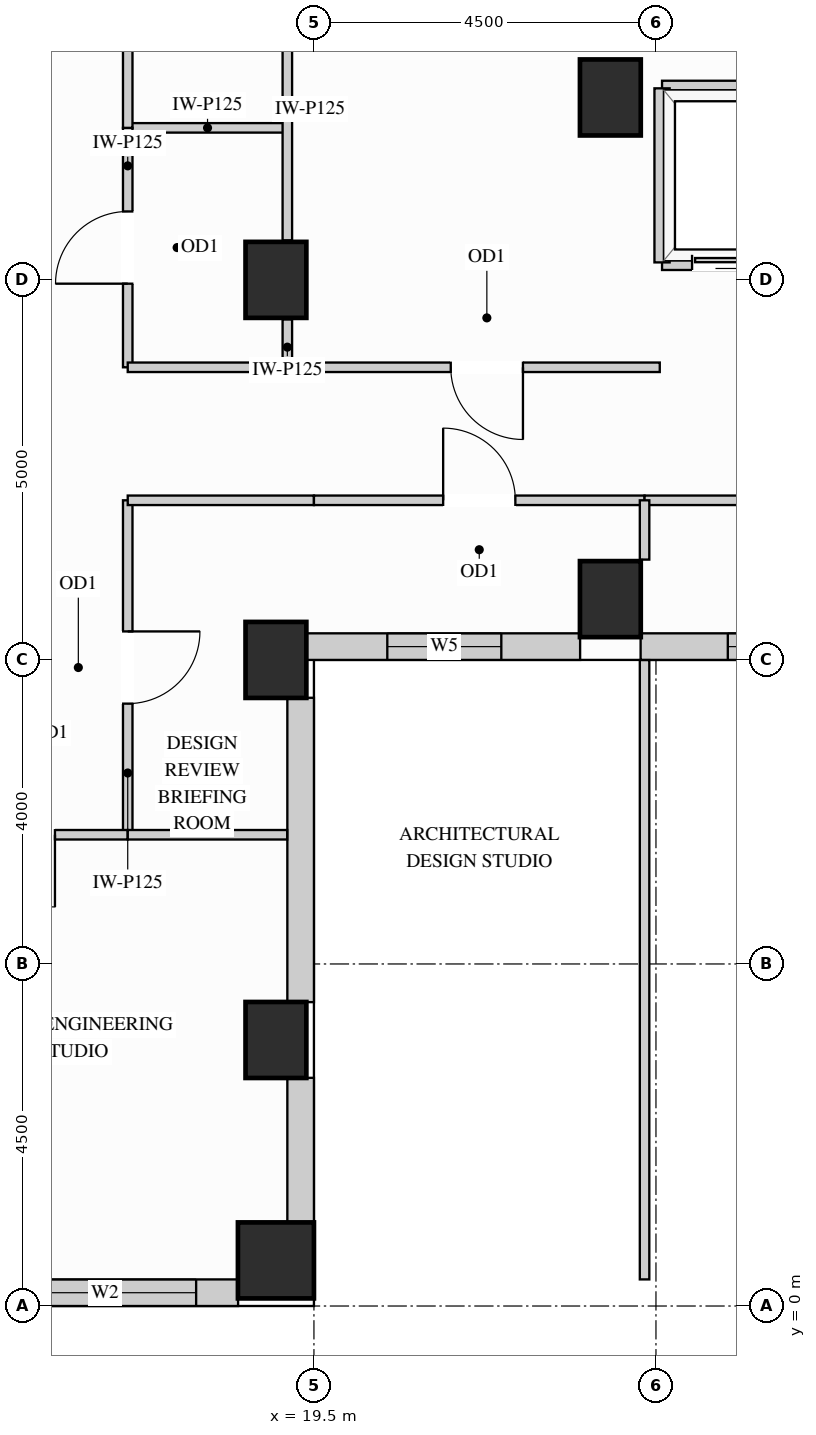
"""IFC4 building model, lengths in metres.
Left out: names, types, materials, properties, quantities, classifications, styles, units other than length and angle.
Written with IfcOpenShell. Run it as: python <this file> out.ifc"""

import sys

from ifc_helpers import new_model, si_unit, direction, frame, frame_2d, origin, origin_2d, place, context, subcontext, project, spatial, rectangle, extrude, source, transform, mapped, element, fill, save


model = new_model("IFC4")
c1 = context("Model", 3, precision=1e-05, world=origin(), true_north=direction((0.0, 1.0)))
c2 = subcontext(c1, "Body", "Model", "MODEL_VIEW")
j1 = project(units=[si_unit("LENGTHUNIT", "METRE"), si_unit("PLANEANGLEUNIT", "RADIAN")], contexts=[c1])
p1 = place(None, origin())
s1 = spatial("IfcSite", under=j1, at=p1, CompositionType="ELEMENT")
p2 = place(p1, origin())
s2 = spatial("IfcBuilding", under=s1, at=p2, CompositionType="ELEMENT")
p3 = place(p2, frame((0.0, 0.0, 200.7)))
s3 = spatial("IfcBuildingStorey", under=s2, at=p3, CompositionType="ELEMENT", Elevation=200.7)
m1 = source(origin(), c2, "Body", "SweptSolid", [
    extrude(rectangle(XDim=0.8, YDim=1.0, at=origin_2d()), origin(), (0.0, 0.0, 1.0), 3.4),
])
for number, where, z_axis, x_axis in (
    (1, (19.0, 13.5, 0.0), (0.0, 0.0, 1.0), (1.0, 0.0, 0.0)),
    (2, (19.0, 3.5, 0.0), (0.0, 0.0, 1.0), (1.0, 0.0, 0.0)),
    (3, (19.0, 8.5, 0.0), (0.0, 0.0, 1.0), (1.0, 0.0, 0.0)),
    (4, (23.4, 15.9, 0.0), (0.0, 0.0, 1.0), (1.0, 0.0, 0.0)),
    (5, (23.4, 9.3, 0.0), (0.0, 0.0, 1.0), (1.0, 0.0, 0.0)),
):
    element("IfcColumn", number, at=place(p3, frame(where, z_axis=z_axis, x_axis=x_axis)), inside=s3, PredefinedType="COLUMN", context=c2, shape_type="MappedRepresentation", body=[
        mapped(m1, transform((0.0, 0.0, 0.0), x_axis=(1.0, 0.0, 0.0), y_axis=(0.0, 1.0, 0.0), z_axis=(0.0, 0.0, 1.0))),
    ])
m2 = source(origin(), c2, "Body", "SweptSolid", [
    extrude(rectangle(XDim=1.0, YDim=1.0, at=origin_2d()), origin(), (0.0, 0.0, 1.0), 3.4),
])
p4 = place(p3, frame((19.0, 0.6, 0.0), z_axis=(0.0, 0.0, 1.0), x_axis=(1.0, 0.0, 0.0)))
e6 = element("IfcColumn", 6, at=p4, inside=s3, PredefinedType="COLUMN", context=c2, shape_type="MappedRepresentation", body=[
    mapped(m2, transform((0.0, 0.0, 0.0), x_axis=(1.0, 0.0, 0.0), y_axis=(0.0, 1.0, 0.0), z_axis=(0.0, 0.0, 1.0))),
])
p5 = place(p3, frame((14.998, 0.175, 0.0), z_axis=(0.0, 0.0, 1.0), x_axis=(1.0, 0.0, 0.0)))
e7 = element("IfcWall", 7, at=p5, inside=s3, PredefinedType="SOLIDWALL", context=c2, shape_type="SweptSolid", body=[
    extrude(rectangle(XDim=3.504, YDim=0.35, at=frame_2d((1.752, 0.0))), origin(), (0.0, 0.0, 1.0), 2.612),
])
p6 = place(p5, frame((0.552, 0.0, 0.78)))
e8 = element("IfcOpeningElement", 8, at=p6, cuts=e7, PredefinedType="OPENING", context=c2, shape_type="SweptSolid", body=[
    extrude(rectangle(XDim=2.4, YDim=1.652, at=frame_2d((1.2, 0.826))), frame((0.0, 0.185, 0.0), z_axis=(0.0, -1.0, 0.0), x_axis=(1.0, 0.0, 0.0)), (0.0, 0.0, 1.0), 0.37),
])
m3 = source(origin(), c2, "Body", "SweptSolid", [
    extrude(rectangle(XDim=1.904, YDim=0.35, at=frame_2d((0.952, 0.0))), origin(), (0.0, 0.0, 1.0), 2.612),
])
p7 = place(p3, frame((19.325, 1.098, 0.0), z_axis=(0.0, 0.0, 1.0), x_axis=(0.0, 1.0, 0.0)))
e9 = element("IfcWall", 9, at=p7, inside=s3, PredefinedType="SOLIDWALL", context=c2, shape_type="MappedRepresentation", body=[
    mapped(m3, transform((0.0, 0.0, 0.0), x_axis=(1.0, 0.0, 0.0), y_axis=(0.0, 1.0, 0.0), z_axis=(0.0, 0.0, 1.0))),
])
m4 = source(origin(), c2, "Body", "SweptSolid", [
    extrude(rectangle(XDim=4.004, YDim=0.35, at=frame_2d((2.002, 0.0))), origin(), (0.0, 0.0, 1.0), 2.612),
])
p8 = place(p3, frame((19.325, 3.998, 0.0), z_axis=(0.0, 0.0, 1.0), x_axis=(0.0, 1.0, 0.0)))
e10 = element("IfcWall", 10, at=p8, inside=s3, PredefinedType="SOLIDWALL", context=c2, shape_type="MappedRepresentation", body=[
    mapped(m4, transform((0.0, 0.0, 0.0), x_axis=(1.0, 0.0, 0.0), y_axis=(0.0, 1.0, 0.0), z_axis=(0.0, 0.0, 1.0))),
])
p9 = place(p3, frame((19.398, 8.675, 0.0), z_axis=(0.0, 0.0, 1.0), x_axis=(1.0, 0.0, 0.0)))
e11 = element("IfcWall", 11, at=p9, inside=s3, PredefinedType="SOLIDWALL", context=c2, shape_type="SweptSolid", body=[
    extrude(rectangle(XDim=3.604, YDim=0.35, at=frame_2d((1.802, 0.0))), origin(), (0.0, 0.0, 1.0), 3.385),
])
p10 = place(p9, frame((1.067, 0.0, 0.78)))
e12 = element("IfcOpeningElement", 12, at=p10, cuts=e11, PredefinedType="OPENING", context=c2, shape_type="SweptSolid", body=[
    extrude(rectangle(XDim=1.5, YDim=2.0, at=frame_2d((0.75, 1.0))), frame((0.0, 0.185, 0.0), z_axis=(0.0, -1.0, 0.0), x_axis=(1.0, 0.0, 0.0)), (0.0, 0.0, 1.0), 0.37),
])
p11 = place(p3, frame((23.798, 8.675, 0.0), z_axis=(0.0, 0.0, 1.0), x_axis=(1.0, 0.0, 0.0)))
e13 = element("IfcWall", 13, at=p11, inside=s3, PredefinedType="SOLIDWALL", context=c2, shape_type="SweptSolid", body=[
    extrude(rectangle(XDim=6.304, YDim=0.35, at=frame_2d((3.152, 0.0))), origin(), (0.0, 0.0, 1.0), 3.385),
])
p12 = place(p11, frame((1.147, 0.0, 0.78)))
e14 = element("IfcOpeningElement", 14, at=p12, cuts=e13, PredefinedType="OPENING", context=c2, shape_type="SweptSolid", body=[
    extrude(rectangle(XDim=1.5, YDim=2.0, at=frame_2d((0.75, 1.0))), frame((0.0, 0.185, 0.0), z_axis=(0.0, -1.0, 0.0), x_axis=(1.0, 0.0, 0.0)), (0.0, 0.0, 1.0), 0.37),
])
p13 = place(p11, frame((3.475, 0.0, 0.78)))
e15 = element("IfcOpeningElement", 15, at=p13, cuts=e13, PredefinedType="OPENING", context=c2, shape_type="SweptSolid", body=[
    extrude(rectangle(XDim=1.5, YDim=2.0, at=frame_2d((0.75, 1.0))), frame((0.0, 0.185, 0.0), z_axis=(0.0, -1.0, 0.0), x_axis=(1.0, 0.0, 0.0)), (0.0, 0.0, 1.0), 0.37),
])
m5 = source(origin(), c2, "Body", "SweptSolid", [
    extrude(rectangle(XDim=2.1, YDim=0.125, at=frame_2d((1.05, 0.0))), origin(), (0.0, 0.0, 1.0), 3.385),
])
p14 = place(p3, frame((17.05, 15.5, 0.0), z_axis=(0.0, 0.0, 1.0), x_axis=(1.0, 0.0, 0.0)))
e16 = element("IfcWall", 16, at=p14, inside=s3, PredefinedType="PARTITIONING", context=c2, shape_type="MappedRepresentation", body=[
    mapped(m5, transform((0.0, 0.0, 0.0), x_axis=(1.0, 0.0, 0.0), y_axis=(0.0, 1.0, 0.0), z_axis=(0.0, 0.0, 1.0))),
])
m6 = source(origin(), c2, "Body", "SweptSolid", [
    extrude(rectangle(XDim=0.63, YDim=0.125, at=frame_2d((0.315, 0.0))), origin(), (0.0, 0.0, 1.0), 2.773),
])
p15 = place(p3, frame((19.15, 12.35, 0.0), z_axis=(0.0, 0.0, 1.0), x_axis=(0.0, 1.0, 0.0)))
e17 = element("IfcWall", 17, at=p15, inside=s3, PredefinedType="PARTITIONING", context=c2, shape_type="MappedRepresentation", body=[
    mapped(m6, transform((0.0, 0.0, 0.0), x_axis=(1.0, 0.0, 0.0), y_axis=(0.0, 1.0, 0.0), z_axis=(0.0, 0.0, 1.0))),
])
m7 = source(origin(), c2, "Body", "SweptSolid", [
    extrude(rectangle(XDim=3.46, YDim=0.125, at=frame_2d((1.73, 0.0))), origin(), (0.0, 0.0, 1.0), 2.773),
])
p16 = place(p3, frame((19.15, 14.02, 0.0), z_axis=(0.0, 0.0, 1.0), x_axis=(0.0, 1.0, 0.0)))
e18 = element("IfcWall", 18, at=p16, inside=s3, PredefinedType="PARTITIONING", context=c2, shape_type="MappedRepresentation", body=[
    mapped(m7, transform((0.0, 0.0, 0.0), x_axis=(1.0, 0.0, 0.0), y_axis=(0.0, 1.0, 0.0), z_axis=(0.0, 0.0, 1.0))),
])
p17 = place(p3, frame((17.05, 12.35, 0.0), z_axis=(0.0, 0.0, 1.0), x_axis=(0.0, 1.0, 0.0)))
e19 = element("IfcWall", 19, at=p17, inside=s3, PredefinedType="PARTITIONING", context=c2, shape_type="SweptSolid", body=[
    extrude(rectangle(XDim=3.15, YDim=0.125, at=frame_2d((1.575, 0.0))), origin(), (0.0, 0.0, 1.0), 3.385),
])
p18 = place(p17, frame((1.1, 0.0, 0.0)))
e20 = element("IfcOpeningElement", 20, at=p18, cuts=e19, PredefinedType="OPENING", context=c2, shape_type="SweptSolid", body=[
    extrude(rectangle(XDim=0.95, YDim=2.15, at=frame_2d((0.475, 1.075))), frame((0.0, 0.073, 0.0), z_axis=(0.0, -1.0, 0.0), x_axis=(1.0, 0.0, 0.0)), (0.0, 0.0, 1.0), 0.145),
])
p19 = place(p3, frame((17.05, 15.5, 0.0), z_axis=(0.0, 0.0, 1.0), x_axis=(0.0, 1.0, 0.0)))
e21 = element("IfcWall", 21, at=p19, inside=s3, PredefinedType="PARTITIONING", context=c2, shape_type="SweptSolid", body=[
    extrude(rectangle(XDim=7.85, YDim=0.125, at=frame_2d((3.925, 0.0))), origin(), (0.0, 0.0, 1.0), 3.385),
])
p20 = place(p19, frame((3.45, 0.0, 0.0)))
e22 = element("IfcOpeningElement", 22, at=p20, cuts=e21, PredefinedType="OPENING", context=c2, shape_type="SweptSolid", body=[
    extrude(rectangle(XDim=0.95, YDim=2.15, at=frame_2d((0.475, 1.075))), frame((0.0, 0.073, 0.0), z_axis=(0.0, -1.0, 0.0), x_axis=(1.0, 0.0, 0.0)), (0.0, 0.0, 1.0), 0.145),
])
p21 = place(p3, frame((17.05, 6.2, 0.0), z_axis=(0.0, 0.0, 1.0), x_axis=(0.0, 1.0, 0.0)))
e23 = element("IfcWall", 23, at=p21, inside=s3, PredefinedType="PARTITIONING", context=c2, shape_type="SweptSolid", body=[
    extrude(rectangle(XDim=4.4, YDim=0.125, at=frame_2d((2.2, 0.0))), origin(), (0.0, 0.0, 1.0), 3.385),
])
p22 = place(p21, frame((1.725, 0.0, 0.0)))
e24 = element("IfcOpeningElement", 24, at=p22, cuts=e23, PredefinedType="OPENING", context=c2, shape_type="SweptSolid", body=[
    extrude(rectangle(XDim=0.95, YDim=2.15, at=frame_2d((0.475, 1.075))), frame((0.0, 0.073, 0.0), z_axis=(0.0, -1.0, 0.0), x_axis=(1.0, 0.0, 0.0)), (0.0, 0.0, 1.0), 0.145),
])
m8 = source(origin(), c2, "Body", "SweptSolid", [
    extrude(rectangle(XDim=2.45, YDim=0.125, at=frame_2d((1.225, 0.0))), origin(), (0.0, 0.0, 1.0), 3.385),
])
p23 = place(p3, frame((17.05, 12.35, 0.0), z_axis=(0.0, 0.0, 1.0), x_axis=(1.0, 0.0, 0.0)))
e25 = element("IfcWall", 25, at=p23, inside=s3, PredefinedType="PARTITIONING", context=c2, shape_type="MappedRepresentation", body=[
    mapped(m8, transform((0.0, 0.0, 0.0), x_axis=(1.0, 0.0, 0.0), y_axis=(0.0, 1.0, 0.0), z_axis=(0.0, 0.0, 1.0))),
])
p24 = place(p3, frame((19.5, 12.35, 0.0), z_axis=(0.0, 0.0, 1.0), x_axis=(1.0, 0.0, 0.0)))
e26 = element("IfcWall", 26, at=p24, inside=s3, PredefinedType="PARTITIONING", context=c2, shape_type="SweptSolid", body=[
    extrude(rectangle(XDim=4.55, YDim=0.125, at=frame_2d((2.275, 0.0))), origin(), (0.0, 0.0, 1.0), 3.385),
])
p25 = place(p24, frame((1.8, 0.0, 0.0)))
e27 = element("IfcOpeningElement", 27, at=p25, cuts=e26, PredefinedType="OPENING", context=c2, shape_type="SweptSolid", body=[
    extrude(rectangle(XDim=0.95, YDim=2.15, at=frame_2d((0.475, 1.075))), frame((0.0, 0.073, 0.0), z_axis=(0.0, -1.0, 0.0), x_axis=(1.0, 0.0, 0.0)), (0.0, 0.0, 1.0), 0.145),
])
p26 = place(p3, frame((17.05, 10.6, 0.0), z_axis=(0.0, 0.0, 1.0), x_axis=(1.0, 0.0, 0.0)))
e28 = element("IfcWall", 28, at=p26, inside=s3, PredefinedType="PARTITIONING", context=c2, shape_type="MappedRepresentation", body=[
    mapped(m8, transform((0.0, 0.0, 0.0), x_axis=(1.0, 0.0, 0.0), y_axis=(0.0, 1.0, 0.0), z_axis=(0.0, 0.0, 1.0))),
])
p27 = place(p3, frame((19.5, 10.6, 0.0), z_axis=(0.0, 0.0, 1.0), x_axis=(1.0, 0.0, 0.0)))
e29 = element("IfcWall", 29, at=p27, inside=s3, PredefinedType="PARTITIONING", context=c2, shape_type="SweptSolid", body=[
    extrude(rectangle(XDim=4.35, YDim=0.125, at=frame_2d((2.175, 0.0))), origin(), (0.0, 0.0, 1.0), 3.385),
])
p28 = place(p27, frame((1.7, 0.0, 0.0)))
e30 = element("IfcOpeningElement", 30, at=p28, cuts=e29, PredefinedType="OPENING", context=c2, shape_type="SweptSolid", body=[
    extrude(rectangle(XDim=0.95, YDim=2.15, at=frame_2d((0.475, 1.075))), frame((0.0, 0.073, 0.0), z_axis=(0.0, -1.0, 0.0), x_axis=(1.0, 0.0, 0.0)), (0.0, 0.0, 1.0), 0.145),
])
p29 = place(p3, frame((23.85, 10.6, 0.0), z_axis=(0.0, 0.0, 1.0), x_axis=(1.0, 0.0, 0.0)))
e31 = element("IfcWall", 31, at=p29, inside=s3, PredefinedType="PARTITIONING", context=c2, shape_type="SweptSolid", body=[
    extrude(rectangle(XDim=6.0, YDim=0.125, at=frame_2d((3.0, 0.0))), origin(), (0.0, 0.0, 1.0), 3.385),
])
p30 = place(p29, frame((2.525, 0.0, 0.0)))
e32 = element("IfcOpeningElement", 32, at=p30, cuts=e31, PredefinedType="OPENING", context=c2, shape_type="SweptSolid", body=[
    extrude(rectangle(XDim=0.95, YDim=2.15, at=frame_2d((0.475, 1.075))), frame((0.0, 0.073, 0.0), z_axis=(0.0, -1.0, 0.0), x_axis=(1.0, 0.0, 0.0)), (0.0, 0.0, 1.0), 0.145),
])
m9 = source(origin(), c2, "Body", "SweptSolid", [
    extrude(rectangle(XDim=8.148, YDim=0.125, at=frame_2d((4.074, 0.0))), origin(), (0.0, 0.0, 1.0), 3.385),
])
p31 = place(p3, frame((23.85, 0.35, 0.0), z_axis=(0.0, 0.0, 1.0), x_axis=(0.0, 1.0, 0.0)))
e33 = element("IfcWall", 33, at=p31, inside=s3, PredefinedType="PARTITIONING", context=c2, shape_type="MappedRepresentation", body=[
    mapped(m9, transform((0.0, 0.0, 0.0), x_axis=(1.0, 0.0, 0.0), y_axis=(0.0, 1.0, 0.0), z_axis=(0.0, 0.0, 1.0))),
])
m10 = source(origin(), c2, "Body", "SweptSolid", [
    extrude(rectangle(XDim=0.78, YDim=0.125, at=frame_2d((0.39, 0.0))), origin(), (0.0, 0.0, 1.0), 3.385),
])
p32 = place(p3, frame((23.85, 9.82, 0.0), z_axis=(0.0, 0.0, 1.0), x_axis=(0.0, 1.0, 0.0)))
e34 = element("IfcWall", 34, at=p32, inside=s3, PredefinedType="PARTITIONING", context=c2, shape_type="MappedRepresentation", body=[
    mapped(m10, transform((0.0, 0.0, 0.0), x_axis=(1.0, 0.0, 0.0), y_axis=(0.0, 1.0, 0.0), z_axis=(0.0, 0.0, 1.0))),
])
p33 = place(p3, frame((14.185, 6.2, 0.0), z_axis=(0.0, 0.0, 1.0), x_axis=(1.0, 0.0, 0.0)))
e35 = element("IfcWall", 35, at=p33, inside=s3, PredefinedType="PARTITIONING", context=c2, shape_type="SweptSolid", body=[
    extrude(rectangle(XDim=2.865, YDim=0.125, at=frame_2d((1.433, 0.0))), origin(), (0.0, 0.0, 1.0), 2.848),
])
p34 = place(p33, frame((0.958, 0.0, 0.0)))
e36 = element("IfcOpeningElement", 36, at=p34, cuts=e35, PredefinedType="OPENING", context=c2, shape_type="SweptSolid", body=[
    extrude(rectangle(XDim=0.95, YDim=2.15, at=frame_2d((0.475, 1.075))), frame((0.0, 0.073, 0.0), z_axis=(0.0, -1.0, 0.0), x_axis=(1.0, 0.0, 0.0)), (0.0, 0.0, 1.0), 0.145),
])
m11 = source(origin(), c2, "Body", "SweptSolid", [
    extrude(rectangle(XDim=2.098, YDim=0.125, at=frame_2d((1.049, 0.0))), origin(), (0.0, 0.0, 1.0), 2.848),
])
p35 = place(p3, frame((17.05, 6.2, 0.0), z_axis=(0.0, 0.0, 1.0), x_axis=(1.0, 0.0, 0.0)))
e37 = element("IfcWall", 37, at=p35, inside=s3, PredefinedType="PARTITIONING", context=c2, shape_type="MappedRepresentation", body=[
    mapped(m11, transform((0.0, 0.0, 0.0), x_axis=(1.0, 0.0, 0.0), y_axis=(0.0, 1.0, 0.0), z_axis=(0.0, 0.0, 1.0))),
])
m12 = source(origin(), c2, "Body", "SweptSolid", [
    extrude(rectangle(XDim=1.89, YDim=0.2, at=frame_2d((0.945, 0.0))), origin(), (0.0, 0.0, 1.0), 2.773),
])
p36 = place(p3, frame((24.08, 16.02, 0.0), z_axis=(0.0, 0.0, 1.0), x_axis=(1.0, 0.0, 0.0)))
e38 = element("IfcWall", 38, at=p36, inside=s3, PredefinedType="PARTITIONING", context=c2, shape_type="MappedRepresentation", body=[
    mapped(m12, transform((0.0, 0.0, 0.0), x_axis=(1.0, 0.0, 0.0), y_axis=(0.0, 1.0, 0.0), z_axis=(0.0, 0.0, 1.0))),
])
p37 = place(p3, frame((24.08, 13.73, 0.0), z_axis=(0.0, 0.0, 1.0), x_axis=(1.0, 0.0, 0.0)))
e39 = element("IfcWall", 39, at=p37, inside=s3, PredefinedType="PARTITIONING", context=c2, shape_type="SweptSolid", body=[
    extrude(rectangle(XDim=1.89, YDim=0.2, at=frame_2d((0.945, 0.0))), origin(), (0.0, 0.0, 1.0), 2.466),
])
p38 = place(p37, frame((0.395, 0.0, 0.0)))
e40 = element("IfcOpeningElement", 40, at=p38, cuts=e39, PredefinedType="OPENING", context=c2, shape_type="SweptSolid", body=[
    extrude(rectangle(XDim=1.1, YDim=2.2, at=frame_2d((0.55, 1.1))), frame((0.0, 0.11, 0.0), z_axis=(0.0, -1.0, 0.0), x_axis=(1.0, 0.0, 0.0)), (0.0, 0.0, 1.0), 0.22),
])
m13 = source(origin(), c2, "Body", "SweptSolid", [
    extrude(rectangle(XDim=2.29, YDim=0.2, at=frame_2d((1.145, 0.0))), origin(), (0.0, 0.0, 1.0), 3.385),
])
p39 = place(p3, frame((24.08, 13.73, 0.0), z_axis=(0.0, 0.0, 1.0), x_axis=(0.0, 1.0, 0.0)))
e41 = element("IfcWall", 41, at=p39, inside=s3, PredefinedType="PARTITIONING", context=c2, shape_type="MappedRepresentation", body=[
    mapped(m13, transform((0.0, 0.0, 0.0), x_axis=(1.0, 0.0, 0.0), y_axis=(0.0, 1.0, 0.0), z_axis=(0.0, 0.0, 1.0))),
])
m14 = source(origin(), c2, "Body", "SweptSolid", [
    extrude(rectangle(XDim=1.1, YDim=2.2, at=frame_2d((0.55, 1.1))), frame((0.0, 0.025, 0.0), z_axis=(0.0, -1.0, 0.0), x_axis=(1.0, 0.0, 0.0)), (0.0, 0.0, 1.0), 0.05),
])
p40 = place(p38, origin())
e42 = element("IfcDoor", 42, at=p40, inside=s3, OperationType="SLIDING_TO_LEFT", PredefinedType="DOOR", context=c2, shape_type="MappedRepresentation", body=[
    mapped(m14, transform((0.0, 0.0, 0.0), x_axis=(1.0, 0.0, 0.0), y_axis=(0.0, 1.0, 0.0), z_axis=(0.0, 0.0, 1.0))),
])
fill(e40, e42)
m15 = source(origin(), c2, "Body", "SweptSolid", [
    extrude(rectangle(XDim=0.95, YDim=2.15, at=frame_2d((0.475, 1.075))), frame((0.0, 0.025, 0.0), z_axis=(0.0, -1.0, 0.0), x_axis=(1.0, 0.0, 0.0)), (0.0, 0.0, 1.0), 0.05),
])
p41 = place(p22, origin())
e43 = element("IfcDoor", 43, at=p41, inside=s3, OperationType="SINGLE_SWING_RIGHT", PredefinedType="DOOR", context=c2, shape_type="MappedRepresentation", body=[
    mapped(m15, transform((0.0, 0.0, 0.0), x_axis=(1.0, 0.0, 0.0), y_axis=(0.0, 1.0, 0.0), z_axis=(0.0, 0.0, 1.0))),
])
fill(e24, e43)
p42 = place(p18, origin())
e44 = element("IfcDoor", 44, at=p42, inside=s3, OperationType="SINGLE_SWING_LEFT", PredefinedType="DOOR", context=c2, shape_type="MappedRepresentation", body=[
    mapped(m15, transform((0.0, 0.0, 0.0), x_axis=(1.0, 0.0, 0.0), y_axis=(0.0, 1.0, 0.0), z_axis=(0.0, 0.0, 1.0))),
])
fill(e20, e44)
p43 = place(p34, origin())
e45 = element("IfcDoor", 45, at=p43, inside=s3, OperationType="SINGLE_SWING_RIGHT", PredefinedType="DOOR", context=c2, shape_type="MappedRepresentation", body=[
    mapped(m15, transform((0.0, 0.0, 0.0), x_axis=(1.0, 0.0, 0.0), y_axis=(0.0, 1.0, 0.0), z_axis=(0.0, 0.0, 1.0))),
])
fill(e36, e45)
p44 = place(p25, origin())
e46 = element("IfcDoor", 46, at=p44, inside=s3, OperationType="SINGLE_SWING_RIGHT", PredefinedType="DOOR", context=c2, shape_type="MappedRepresentation", body=[
    mapped(m15, transform((0.0, 0.0, 0.0), x_axis=(1.0, 0.0, 0.0), y_axis=(0.0, 1.0, 0.0), z_axis=(0.0, 0.0, 1.0))),
])
fill(e27, e46)
p45 = place(p28, origin())
e47 = element("IfcDoor", 47, at=p45, inside=s3, OperationType="SINGLE_SWING_LEFT", PredefinedType="DOOR", context=c2, shape_type="MappedRepresentation", body=[
    mapped(m15, transform((0.0, 0.0, 0.0), x_axis=(1.0, 0.0, 0.0), y_axis=(0.0, 1.0, 0.0), z_axis=(0.0, 0.0, 1.0))),
])
fill(e30, e47)
m16 = source(origin(), c2, "Body", "SweptSolid", [
    extrude(rectangle(XDim=2.4, YDim=1.652, at=frame_2d((1.2, 0.826))), frame((0.0, 0.03, 0.0), z_axis=(0.0, -1.0, 0.0), x_axis=(1.0, 0.0, 0.0)), (0.0, 0.0, 1.0), 0.06),
])
p46 = place(p6, origin())
e48 = element("IfcWindow", 48, at=p46, inside=s3, PartitioningType="SINGLE_PANEL", PredefinedType="WINDOW", context=c2, shape_type="MappedRepresentation", body=[
    mapped(m16, transform((0.0, 0.0, 0.0), x_axis=(1.0, 0.0, 0.0), y_axis=(0.0, 1.0, 0.0), z_axis=(0.0, 0.0, 1.0))),
])
fill(e8, e48)
m17 = source(origin(), c2, "Body", "SweptSolid", [
    extrude(rectangle(XDim=1.5, YDim=2.0, at=frame_2d((0.75, 1.0))), frame((0.0, 0.03, 0.0), z_axis=(0.0, -1.0, 0.0), x_axis=(1.0, 0.0, 0.0)), (0.0, 0.0, 1.0), 0.06),
])
p47 = place(p10, origin())
e49 = element("IfcWindow", 49, at=p47, inside=s3, PartitioningType="SINGLE_PANEL", PredefinedType="WINDOW", context=c2, shape_type="MappedRepresentation", body=[
    mapped(m17, transform((0.0, 0.0, 0.0), x_axis=(1.0, 0.0, 0.0), y_axis=(0.0, 1.0, 0.0), z_axis=(0.0, 0.0, 1.0))),
])
fill(e12, e49)
p48 = place(p12, origin())
e50 = element("IfcWindow", 50, at=p48, inside=s3, PartitioningType="SINGLE_PANEL", PredefinedType="WINDOW", context=c2, shape_type="MappedRepresentation", body=[
    mapped(m17, transform((0.0, 0.0, 0.0), x_axis=(1.0, 0.0, 0.0), y_axis=(0.0, 1.0, 0.0), z_axis=(0.0, 0.0, 1.0))),
])
fill(e14, e50)
save(model, sys.argv[1])
